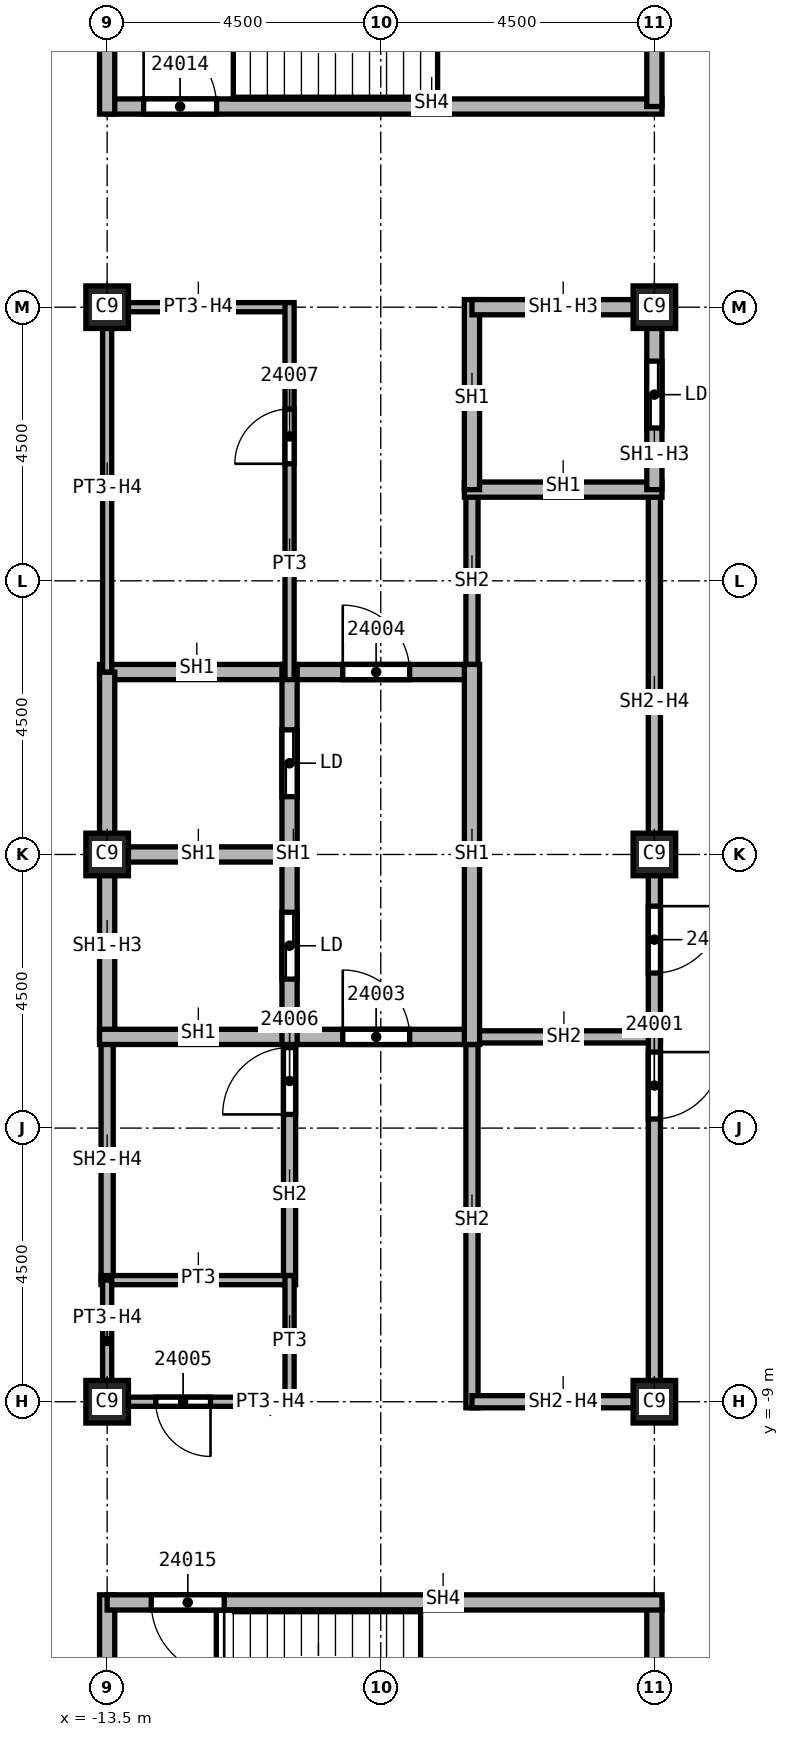
"""IFC4 building model, lengths in metres.
Left out: names, types, materials, properties, quantities, classifications, styles, units other than length and angle.
Written with IfcOpenShell. Run it as: python <this file> out.ifc"""

import sys

from ifc_helpers import new_model, si_unit, direction, frame, frame_2d, origin, origin_2d, place, context, subcontext, project, spatial, rectangle, extrude, element, fill, save


model = new_model("IFC4")
c1 = context("Model", 3, precision=1e-05, world=origin(), true_north=direction((0.0, 1.0)))
c2 = subcontext(c1, "Body", "Model", "MODEL_VIEW")
j1 = project(units=[si_unit("LENGTHUNIT", "METRE"), si_unit("PLANEANGLEUNIT", "RADIAN")], contexts=[c1])
p1 = place(None, origin())
s1 = spatial("IfcSite", under=j1, at=p1, CompositionType="ELEMENT")
p2 = place(p1, origin())
s2 = spatial("IfcBuilding", under=s1, at=p2, CompositionType="ELEMENT")
p3 = place(p2, frame((0.0, 0.0, 342.0)))
s3 = spatial("IfcBuildingStorey", under=s2, at=p3, CompositionType="ELEMENT", Elevation=342.0)
for number, where, z_axis, x_axis in (
    (1, (-4.5, 0.0, 0.0), (0.0, 0.0, 1.0), (1.0, 0.0, 0.0)),
    (2, (-4.5, 9.0, 0.0), (0.0, 0.0, 1.0), (1.0, 0.0, 0.0)),
    (3, (-4.5, -9.0, 0.0), (0.0, 0.0, 1.0), (1.0, 0.0, 0.0)),
    (4, (-13.5, 0.0, 0.0), (0.0, 0.0, 1.0), (1.0, 0.0, 0.0)),
    (5, (-13.5, 9.0, 0.0), (0.0, 0.0, 1.0), (1.0, 0.0, 0.0)),
    (6, (-13.5, -9.0, 0.0), (0.0, 0.0, 1.0), (1.0, 0.0, 0.0)),
):
    element("IfcColumn", number, at=place(p3, frame(where, z_axis=z_axis, x_axis=x_axis)), inside=s3, PredefinedType="COLUMN", context=c2, shape_type="SweptSolid", body=[
        extrude(rectangle(XDim=0.7, YDim=0.7, at=origin_2d()), origin(), (0.0, 0.0, 1.0), 3.74),
    ])
p4 = place(p3, frame((-13.5, -7.0, 0.0), z_axis=(0.0, 0.0, 1.0), x_axis=(0.0, 1.0, 0.0)))
e7 = element("IfcWall", 7, at=p4, inside=s3, PredefinedType="SOLIDWALL", context=c2, shape_type="SweptSolid", body=[
    extrude(rectangle(XDim=4.0, YDim=0.2, at=frame_2d((2.0, 0.0))), origin(), (0.0, 0.0, 1.0), 3.062),
])
p5 = place(p3, frame((-10.5, -7.075, 0.0), z_axis=(0.0, 0.0, 1.0), x_axis=(0.0, 1.0, 0.0)))
e8 = element("IfcWall", 8, at=p5, inside=s3, PredefinedType="SOLIDWALL", context=c2, shape_type="SweptSolid", body=[
    extrude(rectangle(XDim=4.2, YDim=0.2, at=frame_2d((2.1, 0.0))), origin(), (0.0, 0.0, 1.0), 3.74),
])
p6 = place(p5, frame((2.8, 0.0, 0.0)))
e9 = element("IfcOpeningElement", 9, at=p6, cuts=e8, PredefinedType="OPENING", context=c2, shape_type="SweptSolid", body=[
    extrude(rectangle(XDim=1.1, YDim=2.1, at=frame_2d((0.55, 1.05))), frame((0.0, 0.1, 0.0), z_axis=(0.0, -1.0, 0.0), x_axis=(1.0, 0.0, 0.0)), (0.0, 0.0, 1.0), 0.2),
])
p7 = place(p3, frame((-7.625, -3.0, 0.0), z_axis=(0.0, 0.0, 1.0), x_axis=(1.0, 0.0, 0.0)))
e10 = element("IfcWall", 10, at=p7, inside=s3, PredefinedType="SOLIDWALL", context=c2, shape_type="SweptSolid", body=[
    extrude(rectangle(XDim=3.225, YDim=0.2, at=frame_2d((1.613, 0.0))), origin(), (0.0, 0.0, 1.0), 3.74),
])
p8 = place(p3, frame((-7.5, -9.1, 0.0), z_axis=(0.0, 0.0, 1.0), x_axis=(0.0, 1.0, 0.0)))
e11 = element("IfcWall", 11, at=p8, inside=s3, PredefinedType="SOLIDWALL", context=c2, shape_type="SweptSolid", body=[
    extrude(rectangle(XDim=6.225, YDim=0.2, at=frame_2d((3.113, 0.0))), origin(), (0.0, 0.0, 1.0), 3.74),
])
p9 = place(p3, frame((-7.5, 2.875, 0.0), z_axis=(0.0, 0.0, 1.0), x_axis=(0.0, 1.0, 0.0)))
e12 = element("IfcWall", 12, at=p9, inside=s3, PredefinedType="SOLIDWALL", context=c2, shape_type="SweptSolid", body=[
    extrude(rectangle(XDim=3.125, YDim=0.2, at=frame_2d((1.562, 0.0))), origin(), (0.0, 0.0, 1.0), 3.74),
])
p10 = place(p3, frame((-4.5, -9.0, 0.0), z_axis=(0.0, 0.0, 1.0), x_axis=(-1.0, 0.0, 0.0)))
e13 = element("IfcWall", 13, at=p10, inside=s3, PredefinedType="SOLIDWALL", context=c2, shape_type="SweptSolid", body=[
    extrude(rectangle(XDim=3.0, YDim=0.2, at=frame_2d((1.5, 0.0))), origin(), (0.0, 0.0, 1.0), 3.062),
])
p11 = place(p3, frame((-4.5, 6.0, 0.0), z_axis=(0.0, 0.0, 1.0), x_axis=(0.0, -1.0, 0.0)))
e14 = element("IfcWall", 14, at=p11, inside=s3, PredefinedType="SOLIDWALL", context=c2, shape_type="SweptSolid", body=[
    extrude(rectangle(XDim=15.1, YDim=0.2, at=frame_2d((7.55, 0.0))), origin(), (0.0, 0.0, 1.0), 3.062),
])
p12 = place(p11, frame((9.25, 0.0, 0.0)))
e15 = element("IfcOpeningElement", 15, at=p12, cuts=e14, PredefinedType="OPENING", context=c2, shape_type="SweptSolid", body=[
    extrude(rectangle(XDim=1.1, YDim=2.1, at=frame_2d((0.55, 1.05))), frame((0.0, 0.1, 0.0), z_axis=(0.0, -1.0, 0.0), x_axis=(1.0, 0.0, 0.0)), (0.0, 0.0, 1.0), 0.2),
])
p13 = place(p11, frame((6.85, 0.0, 0.0)))
e16 = element("IfcOpeningElement", 16, at=p13, cuts=e14, PredefinedType="OPENING", context=c2, shape_type="SweptSolid", body=[
    extrude(rectangle(XDim=1.1, YDim=2.1, at=frame_2d((0.55, 1.05))), frame((0.0, 0.1, 0.0), z_axis=(0.0, -1.0, 0.0), x_axis=(1.0, 0.0, 0.0)), (0.0, 0.0, 1.0), 0.2),
])
p14 = place(p3, frame((-13.625, 0.0, 0.0), z_axis=(0.0, 0.0, 1.0), x_axis=(1.0, 0.0, 0.0)))
e17 = element("IfcWall", 17, at=p14, inside=s3, PredefinedType="SOLIDWALL", context=c2, shape_type="SweptSolid", body=[
    extrude(rectangle(XDim=3.125, YDim=0.25, at=frame_2d((1.562, 0.0))), origin(), (0.0, 0.0, 1.0), 3.74),
])
p15 = place(p3, frame((-13.625, 3.0, 0.0), z_axis=(0.0, 0.0, 1.0), x_axis=(1.0, 0.0, 0.0)))
e18 = element("IfcWall", 18, at=p15, inside=s3, PredefinedType="SOLIDWALL", context=c2, shape_type="SweptSolid", body=[
    extrude(rectangle(XDim=6.125, YDim=0.25, at=frame_2d((3.062, 0.0))), origin(), (0.0, 0.0, 1.0), 3.74),
])
p16 = place(p15, frame((4.0, 0.0, 0.0)))
e19 = element("IfcOpeningElement", 19, at=p16, cuts=e18, PredefinedType="OPENING", context=c2, shape_type="SweptSolid", body=[
    extrude(rectangle(XDim=1.1, YDim=2.1, at=frame_2d((0.55, 1.05))), frame((0.0, 0.125, 0.0), z_axis=(0.0, -1.0, 0.0), x_axis=(1.0, 0.0, 0.0)), (0.0, 0.0, 1.0), 0.25),
])
p17 = place(p3, frame((-13.5, -3.0, 0.0), z_axis=(0.0, 0.0, 1.0), x_axis=(0.0, 1.0, 0.0)))
e20 = element("IfcWall", 20, at=p17, inside=s3, PredefinedType="SOLIDWALL", context=c2, shape_type="SweptSolid", body=[
    extrude(rectangle(XDim=6.0, YDim=0.25, at=frame_2d((3.0, 0.0))), origin(), (0.0, 0.0, 1.0), 3.062),
])
p18 = place(p3, frame((-13.625, -3.0, 0.0), z_axis=(0.0, 0.0, 1.0), x_axis=(1.0, 0.0, 0.0)))
e21 = element("IfcWall", 21, at=p18, inside=s3, PredefinedType="SOLIDWALL", context=c2, shape_type="SweptSolid", body=[
    extrude(rectangle(XDim=6.125, YDim=0.25, at=frame_2d((3.062, 0.0))), origin(), (0.0, 0.0, 1.0), 3.74),
])
p19 = place(p18, frame((4.0, 0.0, 0.0)))
e22 = element("IfcOpeningElement", 22, at=p19, cuts=e21, PredefinedType="OPENING", context=c2, shape_type="SweptSolid", body=[
    extrude(rectangle(XDim=1.1, YDim=2.1, at=frame_2d((0.55, 1.05))), frame((0.0, 0.125, 0.0), z_axis=(0.0, -1.0, 0.0), x_axis=(1.0, 0.0, 0.0)), (0.0, 0.0, 1.0), 0.25),
])
p20 = place(p3, frame((-10.5, -3.125, 0.0), z_axis=(0.0, 0.0, 1.0), x_axis=(0.0, 1.0, 0.0)))
e23 = element("IfcWall", 23, at=p20, inside=s3, PredefinedType="SOLIDWALL", context=c2, shape_type="SweptSolid", body=[
    extrude(rectangle(XDim=6.25, YDim=0.25, at=frame_2d((3.125, 0.0))), origin(), (0.0, 0.0, 1.0), 3.74),
])
p21 = place(p20, frame((1.075, 0.0, 0.0)))
e24 = element("IfcOpeningElement", 24, at=p21, cuts=e23, PredefinedType="OPENING", context=c2, shape_type="SweptSolid", body=[
    extrude(rectangle(XDim=1.1, YDim=2.1, at=frame_2d((0.55, 1.05))), frame((0.0, 0.125, 0.0), z_axis=(0.0, -1.0, 0.0), x_axis=(1.0, 0.0, 0.0)), (0.0, 0.0, 1.0), 0.25),
])
p22 = place(p20, frame((4.075, 0.0, 0.0)))
e25 = element("IfcOpeningElement", 25, at=p22, cuts=e23, PredefinedType="OPENING", context=c2, shape_type="SweptSolid", body=[
    extrude(rectangle(XDim=1.1, YDim=2.1, at=frame_2d((0.55, 1.05))), frame((0.0, 0.125, 0.0), z_axis=(0.0, -1.0, 0.0), x_axis=(1.0, 0.0, 0.0)), (0.0, 0.0, 1.0), 0.25),
])
p23 = place(p3, frame((-7.625, 6.0, 0.0), z_axis=(0.0, 0.0, 1.0), x_axis=(1.0, 0.0, 0.0)))
e26 = element("IfcWall", 26, at=p23, inside=s3, PredefinedType="SOLIDWALL", context=c2, shape_type="SweptSolid", body=[
    extrude(rectangle(XDim=3.25, YDim=0.25, at=frame_2d((1.625, 0.0))), origin(), (0.0, 0.0, 1.0), 3.74),
])
p24 = place(p3, frame((-7.5, -3.125, 0.0), z_axis=(0.0, 0.0, 1.0), x_axis=(0.0, 1.0, 0.0)))
e27 = element("IfcWall", 27, at=p24, inside=s3, PredefinedType="SOLIDWALL", context=c2, shape_type="SweptSolid", body=[
    extrude(rectangle(XDim=6.25, YDim=0.25, at=frame_2d((3.125, 0.0))), origin(), (0.0, 0.0, 1.0), 3.74),
])
p25 = place(p3, frame((-7.5, 6.0, 0.0), z_axis=(0.0, 0.0, 1.0), x_axis=(0.0, 1.0, 0.0)))
e28 = element("IfcWall", 28, at=p25, inside=s3, PredefinedType="SOLIDWALL", context=c2, shape_type="SweptSolid", body=[
    extrude(rectangle(XDim=3.125, YDim=0.25, at=frame_2d((1.562, 0.0))), origin(), (0.0, 0.0, 1.0), 3.74),
])
p26 = place(p3, frame((-7.5, 9.0, 0.0), z_axis=(0.0, 0.0, 1.0), x_axis=(1.0, 0.0, 0.0)))
e29 = element("IfcWall", 29, at=p26, inside=s3, PredefinedType="SOLIDWALL", context=c2, shape_type="SweptSolid", body=[
    extrude(rectangle(XDim=3.0, YDim=0.25, at=frame_2d((1.5, 0.0))), origin(), (0.0, 0.0, 1.0), 3.062),
])
p27 = place(p3, frame((-4.5, 9.125, 0.0), z_axis=(0.0, 0.0, 1.0), x_axis=(0.0, -1.0, 0.0)))
e30 = element("IfcWall", 30, at=p27, inside=s3, PredefinedType="SOLIDWALL", context=c2, shape_type="SweptSolid", body=[
    extrude(rectangle(XDim=3.125, YDim=0.25, at=frame_2d((1.562, 0.0))), origin(), (0.0, 0.0, 1.0), 3.062),
])
p28 = place(p27, frame((1.012, 0.0, 0.0)))
e31 = element("IfcOpeningElement", 31, at=p28, cuts=e30, PredefinedType="OPENING", context=c2, shape_type="SweptSolid", body=[
    extrude(rectangle(XDim=1.1, YDim=2.1, at=frame_2d((0.55, 1.05))), frame((0.0, 0.125, 0.0), z_axis=(0.0, -1.0, 0.0), x_axis=(1.0, 0.0, 0.0)), (0.0, 0.0, 1.0), 0.25),
])
p29 = place(p3, frame((-13.5, -12.175, 0.0), z_axis=(0.0, 0.0, 1.0), x_axis=(0.0, -1.0, 0.0)))
e32 = element("IfcWall", 32, at=p29, inside=s3, PredefinedType="SOLIDWALL", context=c2, shape_type="SweptSolid", body=[
    extrude(rectangle(XDim=4.75, YDim=0.25, at=frame_2d((2.375, 0.0))), origin(), (0.0, 0.0, 1.0), 3.74),
])
p30 = place(p3, frame((-13.5, 12.3, 0.0), z_axis=(0.0, 0.0, 1.0), x_axis=(1.0, 0.0, 0.0)))
e33 = element("IfcWall", 33, at=p30, inside=s3, PredefinedType="SOLIDWALL", context=c2, shape_type="SweptSolid", body=[
    extrude(rectangle(XDim=9.125, YDim=0.25, at=frame_2d((4.562, 0.0))), origin(), (0.0, 0.0, 1.0), 3.74),
])
p31 = place(p30, frame((0.6, 0.0, 0.0)))
e34 = element("IfcOpeningElement", 34, at=p31, cuts=e33, PredefinedType="OPENING", context=c2, shape_type="SweptSolid", body=[
    extrude(rectangle(XDim=1.2, YDim=2.1, at=frame_2d((0.6, 1.05))), frame((0.0, 0.125, 0.0), z_axis=(0.0, -1.0, 0.0), x_axis=(1.0, 0.0, 0.0)), (0.0, 0.0, 1.0), 0.25),
])
p32 = place(p3, frame((-13.5, 12.175, 0.0), z_axis=(0.0, 0.0, 1.0), x_axis=(0.0, 1.0, 0.0)))
e35 = element("IfcWall", 35, at=p32, inside=s3, PredefinedType="SOLIDWALL", context=c2, shape_type="SweptSolid", body=[
    extrude(rectangle(XDim=4.75, YDim=0.25, at=frame_2d((2.375, 0.0))), origin(), (0.0, 0.0, 1.0), 3.74),
])
p33 = place(p3, frame((-4.5, -12.3, 0.0), z_axis=(0.0, 0.0, 1.0), x_axis=(0.0, -1.0, 0.0)))
e36 = element("IfcWall", 36, at=p33, inside=s3, PredefinedType="SOLIDWALL", context=c2, shape_type="SweptSolid", body=[
    extrude(rectangle(XDim=4.625, YDim=0.25, at=frame_2d((2.312, 0.0))), origin(), (0.0, 0.0, 1.0), 3.74),
])
p34 = place(p3, frame((-4.5, 16.8, 0.0), z_axis=(0.0, 0.0, 1.0), x_axis=(0.0, -1.0, 0.0)))
e37 = element("IfcWall", 37, at=p34, inside=s3, PredefinedType="SOLIDWALL", context=c2, shape_type="SweptSolid", body=[
    extrude(rectangle(XDim=4.5, YDim=0.25, at=frame_2d((2.25, 0.0))), origin(), (0.0, 0.0, 1.0), 3.74),
])
p35 = place(p3, frame((-4.375, -12.3, 0.0), z_axis=(0.0, 0.0, 1.0), x_axis=(-1.0, 0.0, 0.0)))
e38 = element("IfcWall", 38, at=p35, inside=s3, PredefinedType="SOLIDWALL", context=c2, shape_type="SweptSolid", body=[
    extrude(rectangle(XDim=9.125, YDim=0.25, at=frame_2d((4.562, 0.0))), origin(), (0.0, 0.0, 1.0), 3.74),
])
p36 = place(p35, frame((7.2, 0.0, 0.0)))
e39 = element("IfcOpeningElement", 39, at=p36, cuts=e38, PredefinedType="OPENING", context=c2, shape_type="SweptSolid", body=[
    extrude(rectangle(XDim=1.2, YDim=2.1, at=frame_2d((0.6, 1.05))), frame((0.0, 0.125, 0.0), z_axis=(0.0, -1.0, 0.0), x_axis=(1.0, 0.0, 0.0)), (0.0, 0.0, 1.0), 0.25),
])
p37 = place(p3, frame((-13.6, -7.0, 0.0), z_axis=(0.0, 0.0, 1.0), x_axis=(1.0, 0.0, 0.0)))
e40 = element("IfcWall", 40, at=p37, inside=s3, PredefinedType="PARTITIONING", context=c2, shape_type="SweptSolid", body=[
    extrude(rectangle(XDim=3.1, YDim=0.15, at=frame_2d((1.55, 0.0))), origin(), (0.0, 0.0, 1.0), 3.74),
])
p38 = place(p3, frame((-13.5, -9.075, 0.0), z_axis=(0.0, 0.0, 1.0), x_axis=(0.0, 1.0, 0.0)))
e41 = element("IfcWall", 41, at=p38, inside=s3, PredefinedType="PARTITIONING", context=c2, shape_type="SweptSolid", body=[
    extrude(rectangle(XDim=2.075, YDim=0.15, at=frame_2d((1.038, 0.0))), origin(), (0.0, 0.0, 1.0), 3.062),
])
p39 = place(p3, frame((-13.5, 3.0, 0.0), z_axis=(0.0, 0.0, 1.0), x_axis=(0.0, 1.0, 0.0)))
e42 = element("IfcWall", 42, at=p39, inside=s3, PredefinedType="PARTITIONING", context=c2, shape_type="SweptSolid", body=[
    extrude(rectangle(XDim=6.075, YDim=0.15, at=frame_2d((3.038, 0.0))), origin(), (0.0, 0.0, 1.0), 3.062),
])
p40 = place(p3, frame((-13.5, 9.0, 0.0), z_axis=(0.0, 0.0, 1.0), x_axis=(1.0, 0.0, 0.0)))
e43 = element("IfcWall", 43, at=p40, inside=s3, PredefinedType="PARTITIONING", context=c2, shape_type="SweptSolid", body=[
    extrude(rectangle(XDim=3.0, YDim=0.15, at=frame_2d((1.5, 0.0))), origin(), (0.0, 0.0, 1.0), 3.062),
])
p41 = place(p3, frame((-10.5, -9.075, 0.0), z_axis=(0.0, 0.0, 1.0), x_axis=(0.0, 1.0, 0.0)))
e44 = element("IfcWall", 44, at=p41, inside=s3, PredefinedType="PARTITIONING", context=c2, shape_type="SweptSolid", body=[
    extrude(rectangle(XDim=2.15, YDim=0.15, at=frame_2d((1.075, 0.0))), origin(), (0.0, 0.0, 1.0), 3.74),
])
p42 = place(p3, frame((-10.5, -9.0, 0.0), z_axis=(0.0, 0.0, 1.0), x_axis=(-1.0, 0.0, 0.0)))
e45 = element("IfcWall", 45, at=p42, inside=s3, PredefinedType="PARTITIONING", context=c2, shape_type="SweptSolid", body=[
    extrude(rectangle(XDim=3.0, YDim=0.15, at=frame_2d((1.5, 0.0))), origin(), (0.0, 0.0, 1.0), 3.062),
])
p43 = place(p42, frame((1.3, 0.0, 0.0)))
e46 = element("IfcOpeningElement", 46, at=p43, cuts=e45, PredefinedType="OPENING", context=c2, shape_type="SweptSolid", body=[
    extrude(rectangle(XDim=0.9, YDim=2.1, at=frame_2d((0.45, 1.05))), frame((0.0, 0.075, 0.0), z_axis=(0.0, -1.0, 0.0), x_axis=(1.0, 0.0, 0.0)), (0.0, 0.0, 1.0), 0.15),
])
p44 = place(p3, frame((-10.5, 2.875, 0.0), z_axis=(0.0, 0.0, 1.0), x_axis=(0.0, 1.0, 0.0)))
e47 = element("IfcWall", 47, at=p44, inside=s3, PredefinedType="PARTITIONING", context=c2, shape_type="SweptSolid", body=[
    extrude(rectangle(XDim=6.2, YDim=0.15, at=frame_2d((3.1, 0.0))), origin(), (0.0, 0.0, 1.0), 3.74),
])
p45 = place(p44, frame((3.55, 0.0, 0.0)))
e48 = element("IfcOpeningElement", 48, at=p45, cuts=e47, PredefinedType="OPENING", context=c2, shape_type="SweptSolid", body=[
    extrude(rectangle(XDim=0.9, YDim=2.1, at=frame_2d((0.45, 1.05))), frame((0.0, 0.075, 0.0), z_axis=(0.0, -1.0, 0.0), x_axis=(1.0, 0.0, 0.0)), (0.0, 0.0, 1.0), 0.15),
])
p46 = place(p12, origin())
e49 = element("IfcDoor", 49, at=p46, inside=s3, OperationType="SINGLE_SWING_RIGHT", PredefinedType="DOOR", context=c2, shape_type="SweptSolid", body=[
    extrude(rectangle(XDim=1.1, YDim=2.1, at=frame_2d((0.55, 1.05))), frame((0.0, 0.025, 0.0), z_axis=(0.0, -1.0, 0.0), x_axis=(1.0, 0.0, 0.0)), (0.0, 0.0, 1.0), 0.05),
])
fill(e15, e49)
p47 = place(p13, origin())
e50 = element("IfcDoor", 50, at=p47, inside=s3, OperationType="SINGLE_SWING_LEFT", PredefinedType="DOOR", context=c2, shape_type="SweptSolid", body=[
    extrude(rectangle(XDim=1.1, YDim=2.1, at=frame_2d((0.55, 1.05))), frame((0.0, 0.025, 0.0), z_axis=(0.0, -1.0, 0.0), x_axis=(1.0, 0.0, 0.0)), (0.0, 0.0, 1.0), 0.05),
])
fill(e16, e50)
p48 = place(p19, origin())
e51 = element("IfcDoor", 51, at=p48, inside=s3, OperationType="SINGLE_SWING_RIGHT", PredefinedType="DOOR", context=c2, shape_type="SweptSolid", body=[
    extrude(rectangle(XDim=1.1, YDim=2.1, at=frame_2d((0.55, 1.05))), frame((0.0, 0.025, 0.0), z_axis=(0.0, -1.0, 0.0), x_axis=(1.0, 0.0, 0.0)), (0.0, 0.0, 1.0), 0.05),
])
fill(e22, e51)
p49 = place(p16, origin())
e52 = element("IfcDoor", 52, at=p49, inside=s3, OperationType="SINGLE_SWING_LEFT", PredefinedType="DOOR", context=c2, shape_type="SweptSolid", body=[
    extrude(rectangle(XDim=1.1, YDim=2.1, at=frame_2d((0.55, 1.05))), frame((0.0, 0.025, 0.0), z_axis=(0.0, -1.0, 0.0), x_axis=(1.0, 0.0, 0.0)), (0.0, 0.0, 1.0), 0.05),
])
fill(e19, e52)
p50 = place(p43, origin())
e53 = element("IfcDoor", 53, at=p50, inside=s3, OperationType="SINGLE_SWING_RIGHT", PredefinedType="DOOR", context=c2, shape_type="SweptSolid", body=[
    extrude(rectangle(XDim=0.9, YDim=2.1, at=frame_2d((0.45, 1.05))), frame((0.0, 0.025, 0.0), z_axis=(0.0, -1.0, 0.0), x_axis=(1.0, 0.0, 0.0)), (0.0, 0.0, 1.0), 0.05),
])
fill(e46, e53)
p51 = place(p6, origin())
e54 = element("IfcDoor", 54, at=p51, inside=s3, OperationType="SINGLE_SWING_LEFT", PredefinedType="DOOR", context=c2, shape_type="SweptSolid", body=[
    extrude(rectangle(XDim=1.1, YDim=2.1, at=frame_2d((0.55, 1.05))), frame((0.0, 0.025, 0.0), z_axis=(0.0, -1.0, 0.0), x_axis=(1.0, 0.0, 0.0)), (0.0, 0.0, 1.0), 0.05),
])
fill(e9, e54)
p52 = place(p45, origin())
e55 = element("IfcDoor", 55, at=p52, inside=s3, OperationType="SINGLE_SWING_RIGHT", PredefinedType="DOOR", context=c2, shape_type="SweptSolid", body=[
    extrude(rectangle(XDim=0.9, YDim=2.1, at=frame_2d((0.45, 1.05))), frame((0.0, 0.025, 0.0), z_axis=(0.0, -1.0, 0.0), x_axis=(1.0, 0.0, 0.0)), (0.0, 0.0, 1.0), 0.05),
])
fill(e48, e55)
p53 = place(p31, origin())
e56 = element("IfcDoor", 56, at=p53, inside=s3, OperationType="SINGLE_SWING_LEFT", PredefinedType="DOOR", context=c2, shape_type="SweptSolid", body=[
    extrude(rectangle(XDim=1.2, YDim=2.1, at=frame_2d((0.6, 1.05))), frame((0.0, 0.025, 0.0), z_axis=(0.0, -1.0, 0.0), x_axis=(1.0, 0.0, 0.0)), (0.0, 0.0, 1.0), 0.05),
])
fill(e34, e56)
p54 = place(p36, origin())
e57 = element("IfcDoor", 57, at=p54, inside=s3, OperationType="SINGLE_SWING_RIGHT", PredefinedType="DOOR", context=c2, shape_type="SweptSolid", body=[
    extrude(rectangle(XDim=1.2, YDim=2.1, at=frame_2d((0.6, 1.05))), frame((0.0, 0.025, 0.0), z_axis=(0.0, -1.0, 0.0), x_axis=(1.0, 0.0, 0.0)), (0.0, 0.0, 1.0), 0.05),
])
fill(e39, e57)
p55 = place(p28, origin())
e58 = element("IfcDoor", 58, at=p55, inside=s3, OperationType="SLIDING_TO_LEFT", PredefinedType="DOOR", context=c2, shape_type="SweptSolid", body=[
    extrude(rectangle(XDim=1.1, YDim=2.1, at=frame_2d((0.55, 1.05))), frame((0.0, 0.025, 0.0), z_axis=(0.0, -1.0, 0.0), x_axis=(1.0, 0.0, 0.0)), (0.0, 0.0, 1.0), 0.05),
])
fill(e31, e58)
p56 = place(p21, origin())
e59 = element("IfcDoor", 59, at=p56, inside=s3, OperationType="SLIDING_TO_LEFT", PredefinedType="DOOR", context=c2, shape_type="SweptSolid", body=[
    extrude(rectangle(XDim=1.1, YDim=2.1, at=frame_2d((0.55, 1.05))), frame((0.0, 0.025, 0.0), z_axis=(0.0, -1.0, 0.0), x_axis=(1.0, 0.0, 0.0)), (0.0, 0.0, 1.0), 0.05),
])
fill(e24, e59)
p57 = place(p22, origin())
e60 = element("IfcDoor", 60, at=p57, inside=s3, OperationType="SLIDING_TO_LEFT", PredefinedType="DOOR", context=c2, shape_type="SweptSolid", body=[
    extrude(rectangle(XDim=1.1, YDim=2.1, at=frame_2d((0.55, 1.05))), frame((0.0, 0.025, 0.0), z_axis=(0.0, -1.0, 0.0), x_axis=(1.0, 0.0, 0.0)), (0.0, 0.0, 1.0), 0.05),
])
fill(e25, e60)
save(model, sys.argv[1])
